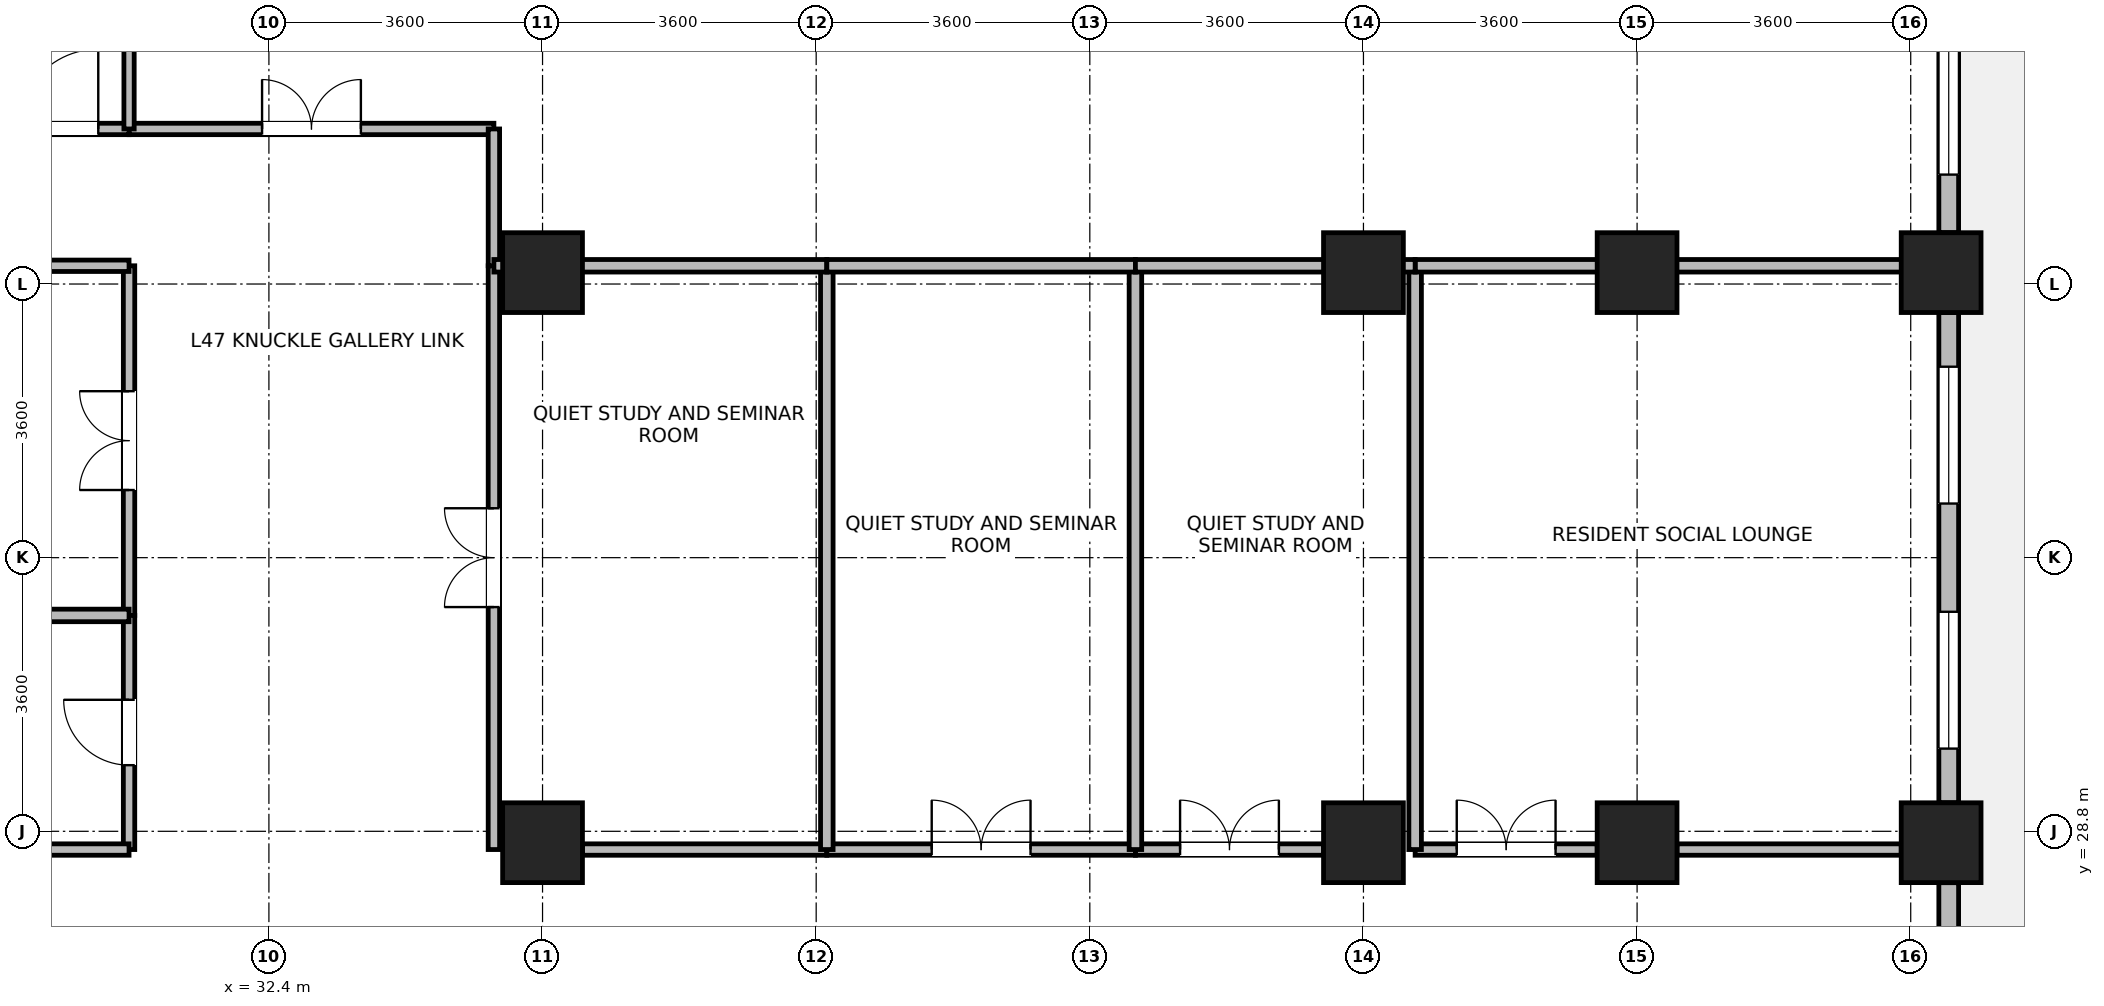
"""IFC4 building model, lengths in metres.
Left out: names, types, materials, properties, quantities, classifications, styles, units other than length and angle.
Written with IfcOpenShell. Run it as: python <this file> out.ifc"""

import sys

from ifc_helpers import new_model, si_unit, direction, frame, frame_2d, origin, origin_2d, place, context, subcontext, project, spatial, rectangle, extrude, source, transform, mapped, element, fill, save


model = new_model("IFC4")
c1 = context("Model", 3, precision=1e-05, world=origin(), true_north=direction((0.0, 1.0)))
c2 = subcontext(c1, "Body", "Model", "MODEL_VIEW")
j1 = project(units=[si_unit("LENGTHUNIT", "METRE"), si_unit("PLANEANGLEUNIT", "RADIAN")], contexts=[c1])
p1 = place(None, origin())
s1 = spatial("IfcSite", under=j1, at=p1, CompositionType="ELEMENT")
p2 = place(p1, origin())
s2 = spatial("IfcBuilding", under=s1, at=p2, CompositionType="ELEMENT")
p3 = place(p2, frame((0.0, 0.0, 184.6)))
s3 = spatial("IfcBuildingStorey", under=s2, at=p3, CompositionType="ELEMENT", Elevation=184.6)
m1 = source(origin(), c2, "Body", "SweptSolid", [
    extrude(rectangle(XDim=1.05, YDim=1.05, at=origin_2d()), origin(), (0.0, 0.0, 1.0), 3.7),
])
for number, where, z_axis, x_axis in (
    (1, (36.0, 28.65, 0.0), (0.0, 0.0, 1.0), (1.0, 0.0, 0.0)),
    (2, (36.0, 36.15, 0.0), (0.0, 0.0, 1.0), (1.0, 0.0, 0.0)),
    (3, (46.8, 28.65, 0.0), (0.0, 0.0, 1.0), (1.0, 0.0, 0.0)),
    (4, (46.8, 36.15, 0.0), (0.0, 0.0, 1.0), (1.0, 0.0, 0.0)),
    (5, (50.4, 28.65, 0.0), (0.0, 0.0, 1.0), (1.0, 0.0, 0.0)),
    (6, (50.4, 36.15, 0.0), (0.0, 0.0, 1.0), (1.0, 0.0, 0.0)),
    (7, (54.4, 28.65, 0.0), (0.0, 0.0, 1.0), (1.0, 0.0, 0.0)),
    (8, (54.4, 36.15, 0.0), (0.0, 0.0, 1.0), (1.0, 0.0, 0.0)),
):
    element("IfcColumn", number, at=place(p3, frame(where, z_axis=z_axis, x_axis=x_axis)), inside=s3, PredefinedType="COLUMN", context=c2, shape_type="MappedRepresentation", body=[
        mapped(m1, transform((0.0, 0.0, 0.0), x_axis=(1.0, 0.0, 0.0), y_axis=(0.0, 1.0, 0.0), z_axis=(0.0, 0.0, 1.0), scale=1.0)),
    ])
p4 = place(p3, frame((54.5, 28.124, 0.0), z_axis=(0.0, 0.0, 1.0), x_axis=(0.0, -1.0, 0.0)))
e9 = element("IfcWall", 9, at=p4, inside=s3, PredefinedType="STANDARD", context=c2, shape_type="SweptSolid", body=[
    extrude(rectangle(XDim=5.998, YDim=0.26, at=frame_2d((2.999, 0.0))), origin(), (0.0, 0.0, 1.0), 2.99),
])
p5 = place(p4, frame((3.598, 0.0, 0.85)))
e10 = element("IfcOpeningElement", 10, at=p5, cuts=e9, PredefinedType="OPENING", context=c2, shape_type="SweptSolid", body=[
    extrude(rectangle(XDim=1.8, YDim=1.85, at=frame_2d((0.9, 0.925))), frame((0.0, 0.14, 0.0), z_axis=(0.0, -1.0, 0.0), x_axis=(1.0, 0.0, 0.0)), (0.0, 0.0, 1.0), 0.28),
])
p6 = place(p4, frame((2.044, 0.0, 0.85)))
e11 = element("IfcOpeningElement", 11, at=p6, cuts=e9, PredefinedType="OPENING", context=c2, shape_type="SweptSolid", body=[
    extrude(rectangle(XDim=0.95, YDim=1.75, at=frame_2d((0.475, 0.875))), frame((0.0, 0.14, 0.0), z_axis=(0.0, -1.0, 0.0), x_axis=(1.0, 0.0, 0.0)), (0.0, 0.0, 1.0), 0.28),
])
p7 = place(p3, frame((54.5, 35.624, 0.0), z_axis=(0.0, 0.0, 1.0), x_axis=(0.0, -1.0, 0.0)))
e12 = element("IfcWall", 12, at=p7, inside=s3, PredefinedType="STANDARD", context=c2, shape_type="SweptSolid", body=[
    extrude(rectangle(XDim=6.448, YDim=0.26, at=frame_2d((3.224, 0.0))), origin(), (0.0, 0.0, 1.0), 2.99),
])
p8 = place(p7, frame((0.712, 0.0, 0.85)))
e13 = element("IfcOpeningElement", 13, at=p8, cuts=e12, PredefinedType="OPENING", context=c2, shape_type="SweptSolid", body=[
    extrude(rectangle(XDim=1.8, YDim=1.85, at=frame_2d((0.9, 0.925))), frame((0.0, 0.14, 0.0), z_axis=(0.0, -1.0, 0.0), x_axis=(1.0, 0.0, 0.0)), (0.0, 0.0, 1.0), 0.28),
])
p9 = place(p7, frame((3.936, 0.0, 0.85)))
e14 = element("IfcOpeningElement", 14, at=p9, cuts=e12, PredefinedType="OPENING", context=c2, shape_type="SweptSolid", body=[
    extrude(rectangle(XDim=1.8, YDim=1.85, at=frame_2d((0.9, 0.925))), frame((0.0, 0.14, 0.0), z_axis=(0.0, -1.0, 0.0), x_axis=(1.0, 0.0, 0.0)), (0.0, 0.0, 1.0), 0.28),
])
p10 = place(p3, frame((54.5, 43.33, 0.0), z_axis=(0.0, 0.0, 1.0), x_axis=(0.0, -1.0, 0.0)))
e15 = element("IfcWall", 15, at=p10, inside=s3, PredefinedType="STANDARD", context=c2, shape_type="SweptSolid", body=[
    extrude(rectangle(XDim=6.654, YDim=0.26, at=frame_2d((3.327, 0.0))), origin(), (0.0, 0.0, 1.0), 3.44),
])
p11 = place(p10, frame((0.763, 0.0, 0.85)))
e16 = element("IfcOpeningElement", 16, at=p11, cuts=e15, PredefinedType="OPENING", context=c2, shape_type="SweptSolid", body=[
    extrude(rectangle(XDim=1.8, YDim=1.85, at=frame_2d((0.9, 0.925))), frame((0.0, 0.14, 0.0), z_axis=(0.0, -1.0, 0.0), x_axis=(1.0, 0.0, 0.0)), (0.0, 0.0, 1.0), 0.28),
])
p12 = place(p10, frame((4.091, 0.0, 0.85)))
e17 = element("IfcOpeningElement", 17, at=p12, cuts=e15, PredefinedType="OPENING", context=c2, shape_type="SweptSolid", body=[
    extrude(rectangle(XDim=1.8, YDim=1.85, at=frame_2d((0.9, 0.925))), frame((0.0, 0.14, 0.0), z_axis=(0.0, -1.0, 0.0), x_axis=(1.0, 0.0, 0.0)), (0.0, 0.0, 1.0), 0.28),
])
p13 = place(p3, frame((35.36, 28.56, 0.0), z_axis=(0.0, 0.0, 1.0), x_axis=(0.0, 1.0, 0.0)))
e18 = element("IfcWall", 18, at=p13, inside=s3, PredefinedType="PARTITIONING", context=c2, shape_type="SweptSolid", body=[
    extrude(rectangle(XDim=7.68, YDim=0.15, at=frame_2d((3.84, 0.0))), origin(), (0.0, 0.0, 1.0), 3.44),
])
p14 = place(p13, frame((3.19, 0.0, 0.0)))
e19 = element("IfcOpeningElement", 19, at=p14, cuts=e18, PredefinedType="OPENING", context=c2, shape_type="SweptSolid", body=[
    extrude(rectangle(XDim=1.3, YDim=2.12, at=frame_2d((0.65, 1.06))), frame((0.0, 0.085, 0.0), z_axis=(0.0, -1.0, 0.0), x_axis=(1.0, 0.0, 0.0)), (0.0, 0.0, 1.0), 0.17),
])
p15 = place(p3, frame((47.48, 28.56, 0.0), z_axis=(0.0, 0.0, 1.0), x_axis=(1.0, 0.0, 0.0)))
e20 = element("IfcWall", 20, at=p15, inside=s3, PredefinedType="PARTITIONING", context=c2, shape_type="SweptSolid", body=[
    extrude(rectangle(XDim=2.395, YDim=0.15, at=frame_2d((1.198, 0.0))), origin(), (0.0, 0.0, 1.0), 2.84),
])
p16 = place(p15, frame((0.548, 0.0, 0.0)))
e21 = element("IfcOpeningElement", 21, at=p16, cuts=e20, PredefinedType="OPENING", context=c2, shape_type="SweptSolid", body=[
    extrude(rectangle(XDim=1.3, YDim=2.12, at=frame_2d((0.65, 1.06))), frame((0.0, 0.085, 0.0), z_axis=(0.0, -1.0, 0.0), x_axis=(1.0, 0.0, 0.0)), (0.0, 0.0, 1.0), 0.17),
])
p17 = place(p3, frame((50.925, 28.56, 0.0), z_axis=(0.0, 0.0, 1.0), x_axis=(1.0, 0.0, 0.0)))
e22 = element("IfcWall", 22, at=p17, inside=s3, PredefinedType="PARTITIONING", context=c2, shape_type="SweptSolid", body=[
    extrude(rectangle(XDim=2.95, YDim=0.15, at=frame_2d((1.475, 0.0))), origin(), (0.0, 0.0, 1.0), 2.84),
])
p18 = place(p3, frame((30.56, 38.04, 0.0), z_axis=(0.0, 0.0, 1.0), x_axis=(1.0, 0.0, 0.0)))
e23 = element("IfcWall", 23, at=p18, inside=s3, PredefinedType="PARTITIONING", context=c2, shape_type="SweptSolid", body=[
    extrude(rectangle(XDim=4.8, YDim=0.15, at=frame_2d((2.4, 0.0))), origin(), (0.0, 0.0, 1.0), 3.44),
])
p19 = place(p18, frame((1.75, 0.0, 0.0)))
e24 = element("IfcOpeningElement", 24, at=p19, cuts=e23, PredefinedType="OPENING", context=c2, shape_type="SweptSolid", body=[
    extrude(rectangle(XDim=1.3, YDim=2.12, at=frame_2d((0.65, 1.06))), frame((0.0, 0.085, 0.0), z_axis=(0.0, -1.0, 0.0), x_axis=(1.0, 0.0, 0.0)), (0.0, 0.0, 1.0), 0.17),
])
p20 = place(p3, frame((30.56, 31.64, 0.0), z_axis=(0.0, 0.0, 1.0), x_axis=(0.0, 1.0, 0.0)))
e25 = element("IfcWall", 25, at=p20, inside=s3, PredefinedType="PARTITIONING", context=c2, shape_type="SweptSolid", body=[
    extrude(rectangle(XDim=4.6, YDim=0.15, at=frame_2d((2.3, 0.0))), origin(), (0.0, 0.0, 1.0), 3.44),
])
p21 = place(p20, frame((1.65, 0.0, 0.0)))
e26 = element("IfcOpeningElement", 26, at=p21, cuts=e25, PredefinedType="OPENING", context=c2, shape_type="SweptSolid", body=[
    extrude(rectangle(XDim=1.3, YDim=2.12, at=frame_2d((0.65, 1.06))), frame((0.0, 0.085, 0.0), z_axis=(0.0, -1.0, 0.0), x_axis=(1.0, 0.0, 0.0)), (0.0, 0.0, 1.0), 0.17),
])
p22 = place(p3, frame((36.525, 28.56, 0.0), z_axis=(0.0, 0.0, 1.0), x_axis=(1.0, 0.0, 0.0)))
e27 = element("IfcWall", 27, at=p22, inside=s3, PredefinedType="PARTITIONING", context=c2, shape_type="SweptSolid", body=[
    extrude(rectangle(XDim=3.215, YDim=0.15, at=frame_2d((1.607, 0.0))), origin(), (0.0, 0.0, 1.0), 2.84),
])
p23 = place(p3, frame((39.74, 28.56, 0.0), z_axis=(0.0, 0.0, 1.0), x_axis=(1.0, 0.0, 0.0)))
e28 = element("IfcWall", 28, at=p23, inside=s3, PredefinedType="PARTITIONING", context=c2, shape_type="SweptSolid", body=[
    extrude(rectangle(XDim=4.06, YDim=0.15, at=frame_2d((2.03, 0.0))), origin(), (0.0, 0.0, 1.0), 2.84),
])
p24 = place(p23, frame((1.38, 0.0, 0.0)))
e29 = element("IfcOpeningElement", 29, at=p24, cuts=e28, PredefinedType="OPENING", context=c2, shape_type="SweptSolid", body=[
    extrude(rectangle(XDim=1.3, YDim=2.12, at=frame_2d((0.65, 1.06))), frame((0.0, 0.085, 0.0), z_axis=(0.0, -1.0, 0.0), x_axis=(1.0, 0.0, 0.0)), (0.0, 0.0, 1.0), 0.17),
])
p25 = place(p3, frame((43.8, 28.56, 0.0), z_axis=(0.0, 0.0, 1.0), x_axis=(1.0, 0.0, 0.0)))
e30 = element("IfcWall", 30, at=p25, inside=s3, PredefinedType="PARTITIONING", context=c2, shape_type="SweptSolid", body=[
    extrude(rectangle(XDim=2.475, YDim=0.15, at=frame_2d((1.237, 0.0))), origin(), (0.0, 0.0, 1.0), 2.84),
])
p26 = place(p25, frame((0.587, 0.0, 0.0)))
e31 = element("IfcOpeningElement", 31, at=p26, cuts=e30, PredefinedType="OPENING", context=c2, shape_type="SweptSolid", body=[
    extrude(rectangle(XDim=1.3, YDim=2.12, at=frame_2d((0.65, 1.06))), frame((0.0, 0.085, 0.0), z_axis=(0.0, -1.0, 0.0), x_axis=(1.0, 0.0, 0.0)), (0.0, 0.0, 1.0), 0.17),
])
p27 = place(p3, frame((30.56, 28.56, 0.0), z_axis=(0.0, 0.0, 1.0), x_axis=(0.0, 1.0, 0.0)))
e32 = element("IfcWall", 32, at=p27, inside=s3, PredefinedType="PARTITIONING", context=c2, shape_type="SweptSolid", body=[
    extrude(rectangle(XDim=3.08, YDim=0.15, at=frame_2d((1.54, 0.0))), origin(), (0.0, 0.0, 1.0), 3.44),
])
p28 = place(p27, frame((1.11, 0.0, 0.0)))
e33 = element("IfcOpeningElement", 33, at=p28, cuts=e32, PredefinedType="OPENING", context=c2, shape_type="SweptSolid", body=[
    extrude(rectangle(XDim=0.86, YDim=2.02, at=frame_2d((0.43, 1.01))), frame((0.0, 0.085, 0.0), z_axis=(0.0, -1.0, 0.0), x_axis=(1.0, 0.0, 0.0)), (0.0, 0.0, 1.0), 0.17),
])
p29 = place(p3, frame((28.7, 38.04, 0.0), z_axis=(0.0, 0.0, 1.0), x_axis=(1.0, 0.0, 0.0)))
e34 = element("IfcWall", 34, at=p29, inside=s3, PredefinedType="PARTITIONING", context=c2, shape_type="SweptSolid", body=[
    extrude(rectangle(XDim=1.86, YDim=0.15, at=frame_2d((0.93, 0.0))), origin(), (0.0, 0.0, 1.0), 3.44),
])
p30 = place(p29, frame((0.405, 0.0, 0.0)))
e35 = element("IfcOpeningElement", 35, at=p30, cuts=e34, PredefinedType="OPENING", context=c2, shape_type="SweptSolid", body=[
    extrude(rectangle(XDim=1.05, YDim=2.12, at=frame_2d((0.525, 1.06))), frame((0.0, 0.085, 0.0), z_axis=(0.0, -1.0, 0.0), x_axis=(1.0, 0.0, 0.0)), (0.0, 0.0, 1.0), 0.17),
])
p31 = place(p3, frame((35.36, 36.24, 0.0), z_axis=(0.0, 0.0, 1.0), x_axis=(0.0, 1.0, 0.0)))
e36 = element("IfcWall", 36, at=p31, inside=s3, PredefinedType="PARTITIONING", context=c2, shape_type="SweptSolid", body=[
    extrude(rectangle(XDim=1.8, YDim=0.15, at=frame_2d((0.9, 0.0))), origin(), (0.0, 0.0, 1.0), 3.44),
])
for number, where, z_axis, x_axis in (
    (37, (29.325, 28.56, 0.0), (0.0, 0.0, 1.0), (1.0, 0.0, 0.0)),
    (38, (29.325, 36.24, 0.0), (0.0, 0.0, 1.0), (1.0, 0.0, 0.0)),
):
    element("IfcWall", number, at=place(p3, frame(where, z_axis=z_axis, x_axis=x_axis)), inside=s3, PredefinedType="PARTITIONING", context=c2, shape_type="SweptSolid", body=[
        extrude(rectangle(XDim=1.235, YDim=0.15, at=frame_2d((0.618, 0.0))), origin(), (0.0, 0.0, 1.0), 2.84),
    ])
for number, where, z_axis, x_axis in (
    (39, (39.74, 28.56, 0.0), (0.0, 0.0, 1.0), (0.0, 1.0, 0.0)),
    (40, (43.8, 28.56, 0.0), (0.0, 0.0, 1.0), (0.0, 1.0, 0.0)),
    (41, (47.48, 28.56, 0.0), (0.0, 0.0, 1.0), (0.0, 1.0, 0.0)),
):
    element("IfcWall", number, at=place(p3, frame(where, z_axis=z_axis, x_axis=x_axis)), inside=s3, PredefinedType="PARTITIONING", context=c2, shape_type="SweptSolid", body=[
        extrude(rectangle(XDim=7.68, YDim=0.165, at=frame_2d((3.84, 0.0))), origin(), (0.0, 0.0, 1.0), 3.44),
    ])
p32 = place(p3, frame((47.48, 36.24, 0.0), z_axis=(0.0, 0.0, 1.0), x_axis=(1.0, 0.0, 0.0)))
e42 = element("IfcWall", 42, at=p32, inside=s3, PredefinedType="PARTITIONING", context=c2, shape_type="SweptSolid", body=[
    extrude(rectangle(XDim=6.888, YDim=0.165, at=frame_2d((3.444, 0.0))), origin(), (0.0, 0.0, 1.0), 2.84),
])
p33 = place(p3, frame((30.56, 38.04, 0.0), z_axis=(0.0, 0.0, 1.0), x_axis=(0.0, 1.0, 0.0)))
e43 = element("IfcWall", 43, at=p33, inside=s3, PredefinedType="PARTITIONING", context=c2, shape_type="SweptSolid", body=[
    extrude(rectangle(XDim=5.028, YDim=0.135, at=frame_2d((2.514, 0.0))), origin(), (0.0, 0.0, 1.0), 3.44),
])
p34 = place(p3, frame((35.36, 36.24, 0.0), z_axis=(0.0, 0.0, 1.0), x_axis=(1.0, 0.0, 0.0)))
e44 = element("IfcWall", 44, at=p34, inside=s3, PredefinedType="PARTITIONING", context=c2, shape_type="SweptSolid", body=[
    extrude(rectangle(XDim=4.38, YDim=0.165, at=frame_2d((2.19, 0.0))), origin(), (0.0, 0.0, 1.0), 2.84),
])
p35 = place(p3, frame((39.74, 36.24, 0.0), z_axis=(0.0, 0.0, 1.0), x_axis=(1.0, 0.0, 0.0)))
e45 = element("IfcWall", 45, at=p35, inside=s3, PredefinedType="PARTITIONING", context=c2, shape_type="SweptSolid", body=[
    extrude(rectangle(XDim=4.06, YDim=0.165, at=frame_2d((2.03, 0.0))), origin(), (0.0, 0.0, 1.0), 2.84),
])
p36 = place(p3, frame((43.8, 36.24, 0.0), z_axis=(0.0, 0.0, 1.0), x_axis=(1.0, 0.0, 0.0)))
e46 = element("IfcWall", 46, at=p36, inside=s3, PredefinedType="PARTITIONING", context=c2, shape_type="SweptSolid", body=[
    extrude(rectangle(XDim=3.68, YDim=0.165, at=frame_2d((1.84, 0.0))), origin(), (0.0, 0.0, 1.0), 2.84),
])
p37 = place(p3, frame((28.84, 31.64, 0.0), z_axis=(0.0, 0.0, 1.0), x_axis=(1.0, 0.0, 0.0)))
e47 = element("IfcWall", 47, at=p37, inside=s3, PredefinedType="PARTITIONING", context=c2, shape_type="SweptSolid", body=[
    extrude(rectangle(XDim=1.72, YDim=0.165, at=frame_2d((0.86, 0.0))), origin(), (0.0, 0.0, 1.0), 3.44),
])
p38 = place(p8, origin())
e48 = element("IfcWindow", 48, at=p38, inside=s3, PartitioningType="SINGLE_PANEL", PredefinedType="WINDOW", context=c2, shape_type="SweptSolid", body=[
    extrude(rectangle(XDim=1.8, YDim=1.85, at=frame_2d((0.9, 0.925))), frame((0.0, 0.03, 0.0), z_axis=(0.0, -1.0, 0.0), x_axis=(1.0, 0.0, 0.0)), (0.0, 0.0, 1.0), 0.06),
])
fill(e13, e48)
p39 = place(p9, origin())
e49 = element("IfcWindow", 49, at=p39, inside=s3, PartitioningType="SINGLE_PANEL", PredefinedType="WINDOW", context=c2, shape_type="SweptSolid", body=[
    extrude(rectangle(XDim=1.8, YDim=1.85, at=frame_2d((0.9, 0.925))), frame((0.0, 0.03, 0.0), z_axis=(0.0, -1.0, 0.0), x_axis=(1.0, 0.0, 0.0)), (0.0, 0.0, 1.0), 0.06),
])
fill(e14, e49)
p40 = place(p12, origin())
e50 = element("IfcWindow", 50, at=p40, inside=s3, PartitioningType="SINGLE_PANEL", PredefinedType="WINDOW", context=c2, shape_type="SweptSolid", body=[
    extrude(rectangle(XDim=1.8, YDim=1.85, at=frame_2d((0.9, 0.925))), frame((0.0, 0.03, 0.0), z_axis=(0.0, -1.0, 0.0), x_axis=(1.0, 0.0, 0.0)), (0.0, 0.0, 1.0), 0.06),
])
fill(e17, e50)
p41 = place(p14, origin())
e51 = element("IfcDoor", 51, at=p41, inside=s3, OperationType="DOUBLE_DOOR_SINGLE_SWING", PredefinedType="DOOR", context=c2, shape_type="SweptSolid", body=[
    extrude(rectangle(XDim=1.3, YDim=2.12, at=frame_2d((0.65, 1.06))), frame((0.0, 0.025, 0.0), z_axis=(0.0, -1.0, 0.0), x_axis=(1.0, 0.0, 0.0)), (0.0, 0.0, 1.0), 0.05),
])
fill(e19, e51)
p42 = place(p16, origin())
e52 = element("IfcDoor", 52, at=p42, inside=s3, OperationType="DOUBLE_DOOR_SINGLE_SWING", PredefinedType="DOOR", context=c2, shape_type="SweptSolid", body=[
    extrude(rectangle(XDim=1.3, YDim=2.12, at=frame_2d((0.65, 1.06))), frame((0.0, 0.025, 0.0), z_axis=(0.0, -1.0, 0.0), x_axis=(1.0, 0.0, 0.0)), (0.0, 0.0, 1.0), 0.05),
])
fill(e21, e52)
p43 = place(p19, origin())
e53 = element("IfcDoor", 53, at=p43, inside=s3, OperationType="DOUBLE_DOOR_SINGLE_SWING", PredefinedType="DOOR", context=c2, shape_type="SweptSolid", body=[
    extrude(rectangle(XDim=1.3, YDim=2.12, at=frame_2d((0.65, 1.06))), frame((0.0, 0.025, 0.0), z_axis=(0.0, -1.0, 0.0), x_axis=(1.0, 0.0, 0.0)), (0.0, 0.0, 1.0), 0.05),
])
fill(e24, e53)
p44 = place(p21, origin())
e54 = element("IfcDoor", 54, at=p44, inside=s3, OperationType="DOUBLE_DOOR_SINGLE_SWING", PredefinedType="DOOR", context=c2, shape_type="SweptSolid", body=[
    extrude(rectangle(XDim=1.3, YDim=2.12, at=frame_2d((0.65, 1.06))), frame((0.0, 0.025, 0.0), z_axis=(0.0, -1.0, 0.0), x_axis=(1.0, 0.0, 0.0)), (0.0, 0.0, 1.0), 0.05),
])
fill(e26, e54)
p45 = place(p24, origin())
e55 = element("IfcDoor", 55, at=p45, inside=s3, OperationType="DOUBLE_DOOR_SINGLE_SWING", PredefinedType="DOOR", context=c2, shape_type="SweptSolid", body=[
    extrude(rectangle(XDim=1.3, YDim=2.12, at=frame_2d((0.65, 1.06))), frame((0.0, 0.025, 0.0), z_axis=(0.0, -1.0, 0.0), x_axis=(1.0, 0.0, 0.0)), (0.0, 0.0, 1.0), 0.05),
])
fill(e29, e55)
p46 = place(p26, origin())
e56 = element("IfcDoor", 56, at=p46, inside=s3, OperationType="DOUBLE_DOOR_SINGLE_SWING", PredefinedType="DOOR", context=c2, shape_type="SweptSolid", body=[
    extrude(rectangle(XDim=1.3, YDim=2.12, at=frame_2d((0.65, 1.06))), frame((0.0, 0.025, 0.0), z_axis=(0.0, -1.0, 0.0), x_axis=(1.0, 0.0, 0.0)), (0.0, 0.0, 1.0), 0.05),
])
fill(e31, e56)
p47 = place(p28, origin())
e57 = element("IfcDoor", 57, at=p47, inside=s3, OperationType="SINGLE_SWING_RIGHT", PredefinedType="DOOR", context=c2, shape_type="SweptSolid", body=[
    extrude(rectangle(XDim=0.86, YDim=2.02, at=frame_2d((0.43, 1.01))), frame((0.0, 0.025, 0.0), z_axis=(0.0, -1.0, 0.0), x_axis=(1.0, 0.0, 0.0)), (0.0, 0.0, 1.0), 0.05),
])
fill(e33, e57)
p48 = place(p30, origin())
e58 = element("IfcDoor", 58, at=p48, inside=s3, OperationType="SINGLE_SWING_RIGHT", PredefinedType="DOOR", context=c2, shape_type="SweptSolid", body=[
    extrude(rectangle(XDim=1.05, YDim=2.12, at=frame_2d((0.525, 1.06))), frame((0.0, 0.025, 0.0), z_axis=(0.0, -1.0, 0.0), x_axis=(1.0, 0.0, 0.0)), (0.0, 0.0, 1.0), 0.05),
])
fill(e35, e58)
save(model, sys.argv[1])
